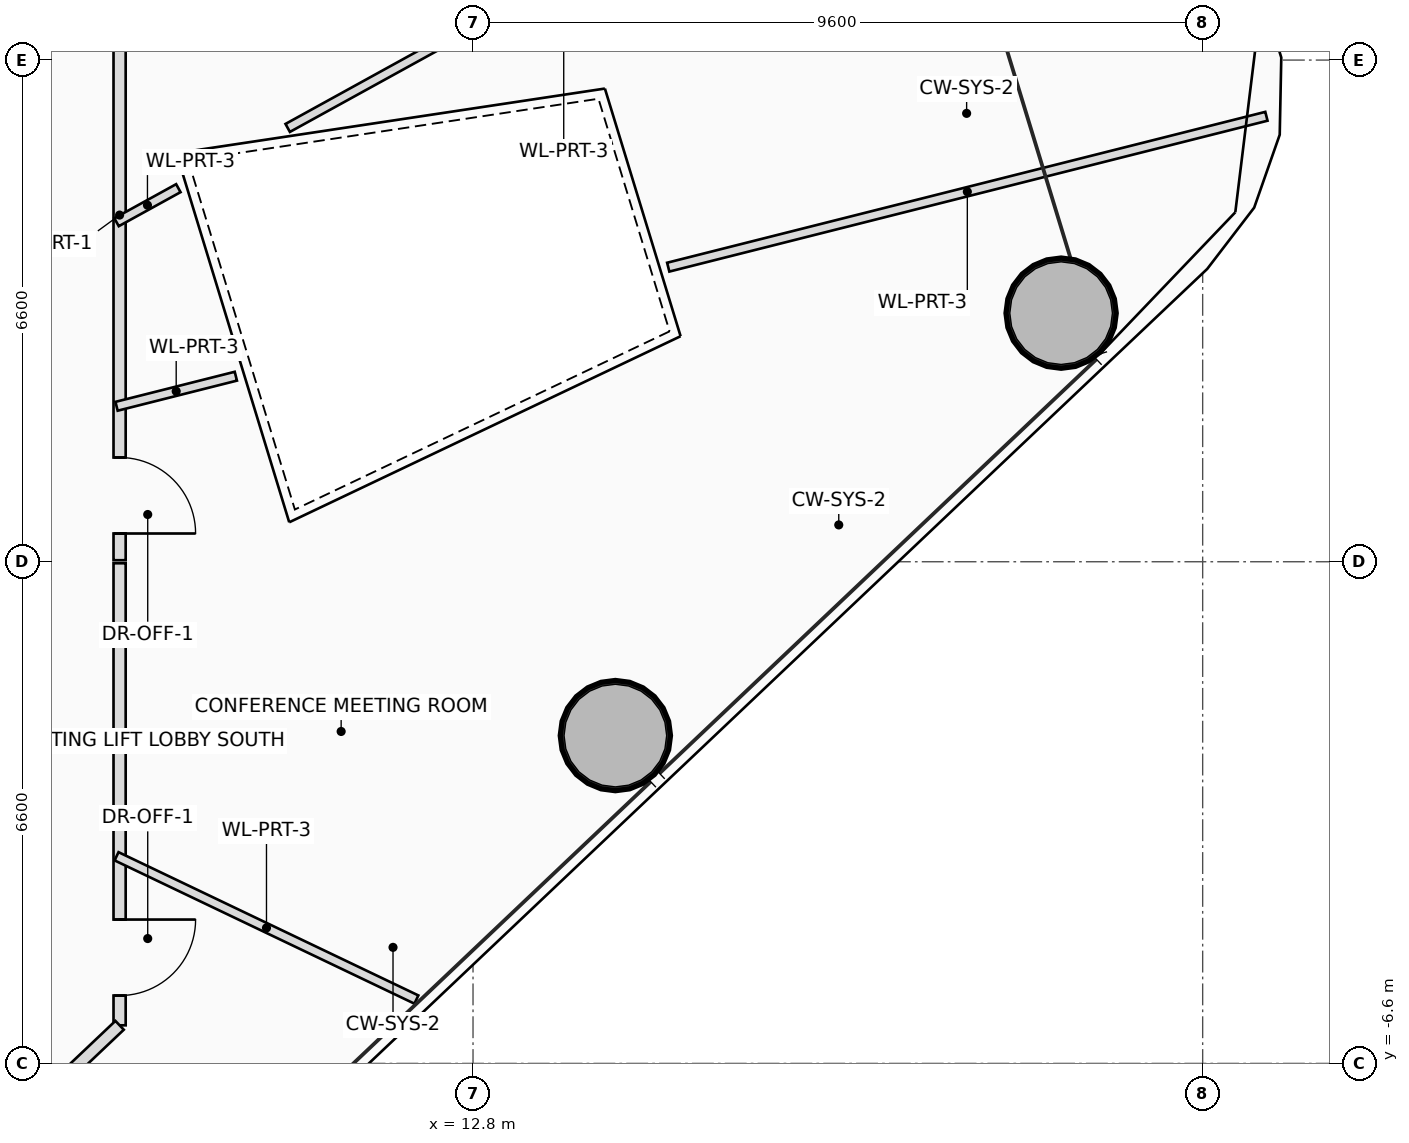
"""IFC4 building model, lengths in metres.
Left out: names, types, materials, properties, quantities, classifications, styles, units other than length and angle.
Written with IfcOpenShell. Run it as: python <this file> out.ifc"""

import sys

from ifc_helpers import new_model, si_unit, direction, frame, frame_2d, origin, origin_2d, place, context, subcontext, project, spatial, rectangle, hollow_circle, extrude, source, transform, mapped, element, fill, save


model = new_model("IFC4")
c1 = context("Model", 3, precision=1e-05, world=origin(), true_north=direction((0.0, 1.0)))
c2 = subcontext(c1, "Body", "Model", "MODEL_VIEW")
j1 = project(units=[si_unit("LENGTHUNIT", "METRE"), si_unit("PLANEANGLEUNIT", "RADIAN")], contexts=[c1])
p1 = place(None, origin())
s1 = spatial("IfcSite", under=j1, at=p1, CompositionType="ELEMENT")
p2 = place(p1, origin())
s2 = spatial("IfcBuilding", under=s1, at=p2, CompositionType="ELEMENT")
p3 = place(p2, frame((0.0, 0.0, 112.4)))
s3 = spatial("IfcBuildingStorey", under=s2, at=p3, CompositionType="ELEMENT", Elevation=112.4)
m1 = source(origin(), c2, "Body", "SweptSolid", [
    extrude(hollow_circle(Radius=0.725, WallThickness=0.05, at=origin_2d()), origin(), (0.0, 0.0, 1.0), 3.75),
])
for number, where, z_axis, x_axis in (
    (1, (14.673, -2.287, 0.0), (0.0, 0.0, 1.0), (1.0, 0.0, 0.0)),
    (2, (20.538, 3.271, 0.0), (0.0, 0.0, 1.0), (1.0, 0.0, 0.0)),
):
    element("IfcColumn", number, at=place(p3, frame(where, z_axis=z_axis, x_axis=x_axis)), inside=s3, PredefinedType="COLUMN", context=c2, shape_type="MappedRepresentation", body=[
        mapped(m1, transform((0.0, 0.0, 0.0), scale=1.0)),
    ])
p4 = place(p3, frame((8.15, 7.6, 0.0), z_axis=(0.0, 0.0, 1.0), x_axis=(0.0, -1.0, 0.0)))
e3 = element("IfcWall", 3, at=p4, inside=s3, PredefinedType="PARTITIONING", context=c2, shape_type="SweptSolid", body=[
    extrude(rectangle(XDim=7.58, YDim=0.16, at=frame_2d((3.79, 0.0))), origin(), (0.0, 0.0, 1.0), 2.85),
])
p5 = place(p4, frame((6.229, 0.0, 0.0)))
e4 = element("IfcOpeningElement", 4, at=p5, cuts=e3, PredefinedType="OPENING", context=c2, shape_type="SweptSolid", body=[
    extrude(rectangle(XDim=1.0, YDim=2.25, at=frame_2d((0.5, 1.125))), frame((0.0, 0.09, 0.0), z_axis=(0.0, -1.0, 0.0), x_axis=(1.0, 0.0, 0.0)), (0.0, 0.0, 1.0), 0.18),
])
p6 = place(p3, frame((8.15, -0.02, 0.0), z_axis=(0.0, 0.0, 1.0), x_axis=(0.0, -1.0, 0.0)))
e5 = element("IfcWall", 5, at=p6, inside=s3, PredefinedType="PARTITIONING", context=c2, shape_type="SweptSolid", body=[
    extrude(rectangle(XDim=6.079, YDim=0.16, at=frame_2d((3.04, 0.0))), origin(), (0.0, 0.0, 1.0), 2.85),
])
p7 = place(p6, frame((4.688, 0.0, 0.0)))
e6 = element("IfcOpeningElement", 6, at=p7, cuts=e5, PredefinedType="OPENING", context=c2, shape_type="SweptSolid", body=[
    extrude(rectangle(XDim=1.0, YDim=2.25, at=frame_2d((0.5, 1.125))), frame((0.0, 0.09, 0.0), z_axis=(0.0, -1.0, 0.0), x_axis=(1.0, 0.0, 0.0)), (0.0, 0.0, 1.0), 0.18),
])
p8 = place(p3, frame((8.15, -6.099, 0.0), z_axis=(0.0, 0.0, 1.0), x_axis=(-0.725854359245, -0.687848420196, 0.0)))
e7 = element("IfcWall", 7, at=p8, inside=s3, PredefinedType="PARTITIONING", context=c2, shape_type="SweptSolid", body=[
    extrude(rectangle(XDim=2.479, YDim=0.16, at=frame_2d((1.24, 0.0))), origin(), (0.0, 0.0, 1.0), 2.85),
])
p9 = place(p3, frame((8.11, -3.875, 0.0), z_axis=(0.0, 0.0, 1.0), x_axis=(0.902280645173, -0.431149205433, 0.0)))
e8 = element("IfcWall", 8, at=p9, inside=s3, PredefinedType="PARTITIONING", context=c2, shape_type="SweptSolid", body=[
    extrude(rectangle(XDim=4.372, YDim=0.12, at=frame_2d((2.186, 0.0))), origin(), (0.0, 0.0, 1.0), 2.85),
])
p10 = place(p3, frame((8.11, 2.045, 0.0), z_axis=(0.0, 0.0, 1.0), x_axis=(0.969634535422, 0.244558515936, 0.0)))
e9 = element("IfcWall", 9, at=p10, inside=s3, PredefinedType="PARTITIONING", context=c2, shape_type="SweptSolid", body=[
    extrude(rectangle(XDim=1.618, YDim=0.12, at=frame_2d((0.809, 0.0))), origin(), (0.0, 0.0, 1.0), 3.21),
])
p11 = place(p3, frame((15.368, 3.875, 0.0), z_axis=(0.0, 0.0, 1.0), x_axis=(0.969639714565, 0.244537980563, 0.0)))
e10 = element("IfcWall", 10, at=p11, inside=s3, PredefinedType="PARTITIONING", context=c2, shape_type="SweptSolid", body=[
    extrude(rectangle(XDim=8.117, YDim=0.12, at=frame_2d((4.058, 0.0))), origin(), (0.0, 0.0, 1.0), 3.01),
])
p12 = place(p3, frame((8.11, 4.467, 0.0), z_axis=(0.0, 0.0, 1.0), x_axis=(0.875876836962, 0.482534730847, 0.0)))
e11 = element("IfcWall", 11, at=p12, inside=s3, PredefinedType="PARTITIONING", context=c2, shape_type="SweptSolid", body=[
    extrude(rectangle(XDim=0.928, YDim=0.12, at=frame_2d((0.464, 0.0))), origin(), (0.0, 0.0, 1.0), 3.21),
])
p13 = place(p3, frame((10.362, 5.707, 0.0), z_axis=(0.0, 0.0, 1.0), x_axis=(0.875911137712, 0.482472464326, 0.0)))
e12 = element("IfcWall", 12, at=p13, inside=s3, PredefinedType="PARTITIONING", context=c2, shape_type="SweptSolid", body=[
    extrude(rectangle(XDim=8.292, YDim=0.12, at=frame_2d((4.146, 0.0))), origin(), (0.0, 0.0, 1.0), 2.85),
])
p14 = place(p5, origin())
e13 = element("IfcDoor", 13, at=p14, inside=s3, OperationType="SINGLE_SWING_RIGHT", PredefinedType="DOOR", context=c2, shape_type="SweptSolid", body=[
    extrude(rectangle(XDim=1.0, YDim=2.25, at=frame_2d((0.5, 1.125))), frame((0.0, 0.025, 0.0), z_axis=(0.0, -1.0, 0.0), x_axis=(1.0, 0.0, 0.0)), (0.0, 0.0, 1.0), 0.05),
])
fill(e4, e13)
p15 = place(p7, origin())
e14 = element("IfcDoor", 14, at=p15, inside=s3, OperationType="SINGLE_SWING_LEFT", PredefinedType="DOOR", context=c2, shape_type="SweptSolid", body=[
    extrude(rectangle(XDim=1.0, YDim=2.25, at=frame_2d((0.5, 1.125))), frame((0.0, 0.025, 0.0), z_axis=(0.0, -1.0, 0.0), x_axis=(1.0, 0.0, 0.0)), (0.0, 0.0, 1.0), 0.05),
])
fill(e6, e14)
save(model, sys.argv[1])
